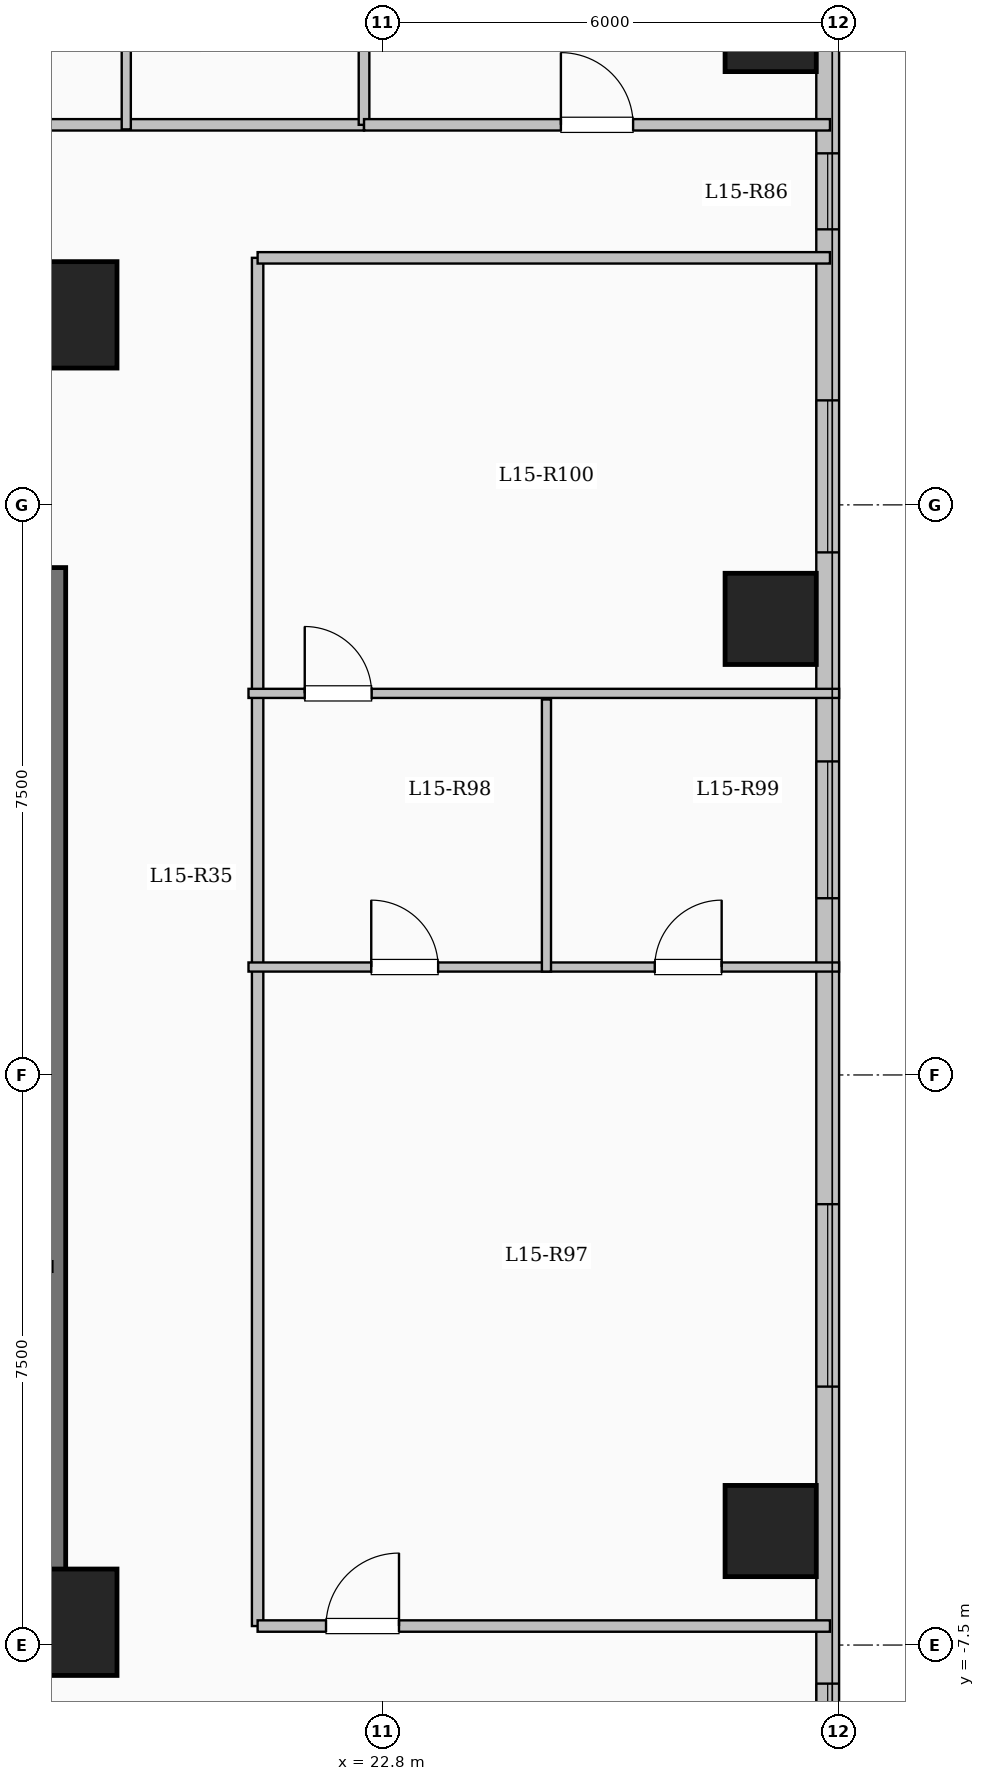
"""IFC4 building model, lengths in metres.
Left out: names, types, materials, properties, quantities, classifications, styles, units other than length and angle.
Written with IfcOpenShell. Run it as: python <this file> out.ifc"""

import sys

from ifc_helpers import new_model, si_unit, direction, frame, frame_2d, origin, origin_2d, place, context, subcontext, project, spatial, rectangle, extrude, element, fill, save


model = new_model("IFC4")
c1 = context("Model", 3, precision=1e-05, world=origin(), true_north=direction((0.0, 1.0)))
c2 = subcontext(c1, "Body", "Model", "MODEL_VIEW")
j1 = project(units=[si_unit("LENGTHUNIT", "METRE"), si_unit("PLANEANGLEUNIT", "RADIAN")], contexts=[c1])
p1 = place(None, origin())
s1 = spatial("IfcSite", under=j1, at=p1, CompositionType="ELEMENT")
p2 = place(p1, origin())
s2 = spatial("IfcBuilding", under=s1, at=p2, CompositionType="ELEMENT")
p3 = place(p2, frame((0.0, 0.0, 57.5)))
s3 = spatial("IfcBuildingStorey", under=s2, at=p3, CompositionType="ELEMENT", Elevation=57.5)
for number, where, z_axis, x_axis in (
    (1, (18.6, -7.2, 0.0), (0.0, 0.0, 1.0), (1.0, 0.0, 0.0)),
    (2, (18.6, 10.0, 0.0), (0.0, 0.0, 1.0), (1.0, 0.0, 0.0)),
):
    element("IfcColumn", number, at=place(p3, frame(where, z_axis=z_axis, x_axis=x_axis)), inside=s3, PredefinedType="COLUMN", context=c2, shape_type="SweptSolid", body=[
        extrude(rectangle(XDim=1.4, YDim=1.4, at=origin_2d()), origin(), (0.0, 0.0, 1.0), 3.35),
    ])
for number, where, z_axis, x_axis in (
    (3, (27.9, -6.0, 0.0), (0.0, 0.0, 1.0), (1.0, 0.0, 0.0)),
    (4, (27.9, 6.0, 0.0), (0.0, 0.0, 1.0), (1.0, 0.0, 0.0)),
    (5, (27.9, 13.8, 0.0), (0.0, 0.0, 1.0), (1.0, 0.0, 0.0)),
):
    element("IfcColumn", number, at=place(p3, frame(where, z_axis=z_axis, x_axis=x_axis)), inside=s3, PredefinedType="COLUMN", context=c2, shape_type="SweptSolid", body=[
        extrude(rectangle(XDim=1.2, YDim=1.2, at=origin_2d()), origin(), (0.0, 0.0, 1.0), 3.35),
    ])
p4 = place(p3, frame((28.65, 19.05, 0.0), z_axis=(0.0, 0.0, 1.0), x_axis=(0.0, -1.0, 0.0)))
e6 = element("IfcWall", 6, at=p4, inside=s3, PredefinedType="SOLIDWALL", context=c2, shape_type="SweptSolid", body=[
    extrude(rectangle(XDim=38.1, YDim=0.3, at=frame_2d((19.05, 0.0))), origin(), (0.0, 0.0, 1.0), 3.1),
])
p5 = place(p4, frame((2.275, 0.0, 0.9)))
e7 = element("IfcOpeningElement", 7, at=p5, cuts=e6, PredefinedType="OPENING", context=c2, shape_type="SweptSolid", body=[
    extrude(rectangle(XDim=2.0, YDim=1.7, at=frame_2d((1.0, 0.85))), frame((0.0, 0.16, 0.0), z_axis=(0.0, -1.0, 0.0), x_axis=(1.0, 0.0, 0.0)), (0.0, 0.0, 1.0), 0.32),
])
p6 = place(p4, frame((6.925, 0.0, 0.95)))
e8 = element("IfcOpeningElement", 8, at=p6, cuts=e6, PredefinedType="OPENING", context=c2, shape_type="SweptSolid", body=[
    extrude(rectangle(XDim=1.0, YDim=1.5, at=frame_2d((0.5, 0.75))), frame((0.0, 0.16, 0.0), z_axis=(0.0, -1.0, 0.0), x_axis=(1.0, 0.0, 0.0)), (0.0, 0.0, 1.0), 0.32),
])
p7 = place(p4, frame((10.175, 0.0, 0.9)))
e9 = element("IfcOpeningElement", 9, at=p7, cuts=e6, PredefinedType="OPENING", context=c2, shape_type="SweptSolid", body=[
    extrude(rectangle(XDim=2.0, YDim=1.7, at=frame_2d((1.0, 0.85))), frame((0.0, 0.16, 0.0), z_axis=(0.0, -1.0, 0.0), x_axis=(1.0, 0.0, 0.0)), (0.0, 0.0, 1.0), 0.32),
])
p8 = place(p4, frame((14.925, 0.0, 0.9)))
e10 = element("IfcOpeningElement", 10, at=p8, cuts=e6, PredefinedType="OPENING", context=c2, shape_type="SweptSolid", body=[
    extrude(rectangle(XDim=1.8, YDim=1.65, at=frame_2d((0.9, 0.825))), frame((0.0, 0.16, 0.0), z_axis=(0.0, -1.0, 0.0), x_axis=(1.0, 0.0, 0.0)), (0.0, 0.0, 1.0), 0.32),
])
p9 = place(p4, frame((20.75, 0.0, 0.9)))
e11 = element("IfcOpeningElement", 11, at=p9, cuts=e6, PredefinedType="OPENING", context=c2, shape_type="SweptSolid", body=[
    extrude(rectangle(XDim=2.4, YDim=1.8, at=frame_2d((1.2, 0.9))), frame((0.0, 0.16, 0.0), z_axis=(0.0, -1.0, 0.0), x_axis=(1.0, 0.0, 0.0)), (0.0, 0.0, 1.0), 0.32),
])
p10 = place(p4, frame((27.058, 0.0, 0.9)))
e12 = element("IfcOpeningElement", 12, at=p10, cuts=e6, PredefinedType="OPENING", context=c2, shape_type="SweptSolid", body=[
    extrude(rectangle(XDim=1.5, YDim=1.65, at=frame_2d((0.75, 0.825))), frame((0.0, 0.16, 0.0), z_axis=(0.0, -1.0, 0.0), x_axis=(1.0, 0.0, 0.0)), (0.0, 0.0, 1.0), 0.32),
])
p11 = place(p4, frame((32.55, 0.0, 0.9)))
e13 = element("IfcOpeningElement", 13, at=p11, cuts=e6, PredefinedType="OPENING", context=c2, shape_type="SweptSolid", body=[
    extrude(rectangle(XDim=2.4, YDim=1.8, at=frame_2d((1.2, 0.9))), frame((0.0, 0.16, 0.0), z_axis=(0.0, -1.0, 0.0), x_axis=(1.0, 0.0, 0.0)), (0.0, 0.0, 1.0), 0.32),
])
p12 = place(p3, frame((18.45, -7.375, 0.0), z_axis=(0.0, 0.0, 1.0), x_axis=(0.0, 1.0, 0.0)))
e14 = element("IfcWall", 14, at=p12, inside=s3, PredefinedType="SHEAR", context=c2, shape_type="SweptSolid", body=[
    extrude(rectangle(XDim=14.05, YDim=0.35, at=frame_2d((7.025, 0.0))), origin(), (0.0, 0.0, 1.0), 3.35),
])
p13 = place(p3, frame((10.075, -7.2, 0.0), z_axis=(0.0, 0.0, 1.0), x_axis=(1.0, 0.0, 0.0)))
e15 = element("IfcWall", 15, at=p13, inside=s3, PredefinedType="SHEAR", context=c2, shape_type="SweptSolid", body=[
    extrude(rectangle(XDim=8.55, YDim=0.35, at=frame_2d((4.275, 0.0))), origin(), (0.0, 0.0, 1.0), 3.35),
])
p14 = place(p3, frame((3.85, 12.5, 0.0), z_axis=(0.0, 0.0, 1.0), x_axis=(1.0, 0.0, 0.0)))
e16 = element("IfcWall", 16, at=p14, inside=s3, PredefinedType="PARTITIONING", context=c2, shape_type="SweptSolid", body=[
    extrude(rectangle(XDim=18.7, YDim=0.15, at=frame_2d((9.35, 0.0))), origin(), (0.0, 0.0, 1.0), 3.1),
])
p15 = place(p14, frame((0.7, 0.0, 0.0)))
e17 = element("IfcOpeningElement", 17, at=p15, cuts=e16, PredefinedType="OPENING", context=c2, shape_type="SweptSolid", body=[
    extrude(rectangle(XDim=0.96, YDim=2.15, at=frame_2d((0.48, 1.075))), frame((0.0, 0.085, 0.0), z_axis=(0.0, -1.0, 0.0), x_axis=(1.0, 0.0, 0.0)), (0.0, 0.0, 1.0), 0.17),
])
p16 = place(p14, frame((8.4, 0.0, 0.0)))
e18 = element("IfcOpeningElement", 18, at=p16, cuts=e16, PredefinedType="OPENING", context=c2, shape_type="SweptSolid", body=[
    extrude(rectangle(XDim=0.96, YDim=2.15, at=frame_2d((0.48, 1.075))), frame((0.0, 0.085, 0.0), z_axis=(0.0, -1.0, 0.0), x_axis=(1.0, 0.0, 0.0)), (0.0, 0.0, 1.0), 0.17),
])
p17 = place(p3, frame((21.15, -7.25, 0.0), z_axis=(0.0, 0.0, 1.0), x_axis=(0.0, 1.0, 0.0)))
e19 = element("IfcWall", 19, at=p17, inside=s3, PredefinedType="PARTITIONING", context=c2, shape_type="SweptSolid", body=[
    extrude(rectangle(XDim=18.0, YDim=0.15, at=frame_2d((9.0, 0.0))), origin(), (0.0, 0.0, 1.0), 2.585),
])
p18 = place(p3, frame((19.422, 12.44, 0.0), z_axis=(0.0, 0.0, 1.0), x_axis=(0.0, 1.0, 0.0)))
e20 = element("IfcWall", 20, at=p18, inside=s3, PredefinedType="PARTITIONING", context=c2, shape_type="SweptSolid", body=[
    extrude(rectangle(XDim=2.45, YDim=0.12, at=frame_2d((1.225, 0.0))), origin(), (0.0, 0.0, 1.0), 3.1),
])
p19 = place(p3, frame((21.15, -7.25, 0.0), z_axis=(0.0, 0.0, 1.0), x_axis=(1.0, 0.0, 0.0)))
e21 = element("IfcWall", 21, at=p19, inside=s3, PredefinedType="PARTITIONING", context=c2, shape_type="SweptSolid", body=[
    extrude(rectangle(XDim=7.53, YDim=0.15, at=frame_2d((3.765, 0.0))), origin(), (0.0, 0.0, 1.0), 3.1),
])
p20 = place(p19, frame((0.9, 0.0, 0.0)))
e22 = element("IfcOpeningElement", 22, at=p20, cuts=e21, PredefinedType="OPENING", context=c2, shape_type="SweptSolid", body=[
    extrude(rectangle(XDim=0.96, YDim=2.15, at=frame_2d((0.48, 1.075))), frame((0.0, 0.085, 0.0), z_axis=(0.0, -1.0, 0.0), x_axis=(1.0, 0.0, 0.0)), (0.0, 0.0, 1.0), 0.17),
])
p21 = place(p3, frame((21.15, 10.75, 0.0), z_axis=(0.0, 0.0, 1.0), x_axis=(1.0, 0.0, 0.0)))
e23 = element("IfcWall", 23, at=p21, inside=s3, PredefinedType="PARTITIONING", context=c2, shape_type="SweptSolid", body=[
    extrude(rectangle(XDim=7.53, YDim=0.15, at=frame_2d((3.765, 0.0))), origin(), (0.0, 0.0, 1.0), 3.1),
])
p22 = place(p3, frame((22.55, 12.5, 0.0), z_axis=(0.0, 0.0, 1.0), x_axis=(0.0, 1.0, 0.0)))
e24 = element("IfcWall", 24, at=p22, inside=s3, PredefinedType="PARTITIONING", context=c2, shape_type="SweptSolid", body=[
    extrude(rectangle(XDim=6.55, YDim=0.14, at=frame_2d((3.275, 0.0))), origin(), (0.0, 0.0, 1.0), 3.1),
])
p23 = place(p3, frame((22.55, 12.5, 0.0), z_axis=(0.0, 0.0, 1.0), x_axis=(1.0, 0.0, 0.0)))
e25 = element("IfcWall", 25, at=p23, inside=s3, PredefinedType="PARTITIONING", context=c2, shape_type="SweptSolid", body=[
    extrude(rectangle(XDim=6.13, YDim=0.15, at=frame_2d((3.065, 0.0))), origin(), (0.0, 0.0, 1.0), 3.1),
])
p24 = place(p23, frame((2.59, 0.0, 0.0)))
e26 = element("IfcOpeningElement", 26, at=p24, cuts=e25, PredefinedType="OPENING", context=c2, shape_type="SweptSolid", body=[
    extrude(rectangle(XDim=0.95, YDim=2.15, at=frame_2d((0.475, 1.075))), frame((0.0, 0.085, 0.0), z_axis=(0.0, -1.0, 0.0), x_axis=(1.0, 0.0, 0.0)), (0.0, 0.0, 1.0), 0.17),
])
p25 = place(p3, frame((21.03, 1.42, 0.0), z_axis=(0.0, 0.0, 1.0), x_axis=(1.0, 0.0, 0.0)))
e27 = element("IfcWall", 27, at=p25, inside=s3, PredefinedType="PARTITIONING", context=c2, shape_type="SweptSolid", body=[
    extrude(rectangle(XDim=7.77, YDim=0.12, at=frame_2d((3.885, 0.0))), origin(), (0.0, 0.0, 1.0), 3.1),
])
p26 = place(p25, frame((1.615, 0.0, 0.0)))
e28 = element("IfcOpeningElement", 28, at=p26, cuts=e27, PredefinedType="OPENING", context=c2, shape_type="SweptSolid", body=[
    extrude(rectangle(XDim=0.88, YDim=2.1, at=frame_2d((0.44, 1.05))), frame((0.0, 0.07, 0.0), z_axis=(0.0, -1.0, 0.0), x_axis=(1.0, 0.0, 0.0)), (0.0, 0.0, 1.0), 0.14),
])
p27 = place(p25, frame((5.345, 0.0, 0.0)))
e29 = element("IfcOpeningElement", 29, at=p27, cuts=e27, PredefinedType="OPENING", context=c2, shape_type="SweptSolid", body=[
    extrude(rectangle(XDim=0.88, YDim=2.1, at=frame_2d((0.44, 1.05))), frame((0.0, 0.07, 0.0), z_axis=(0.0, -1.0, 0.0), x_axis=(1.0, 0.0, 0.0)), (0.0, 0.0, 1.0), 0.14),
])
p28 = place(p3, frame((21.03, 5.02, 0.0), z_axis=(0.0, 0.0, 1.0), x_axis=(1.0, 0.0, 0.0)))
e30 = element("IfcWall", 30, at=p28, inside=s3, PredefinedType="PARTITIONING", context=c2, shape_type="SweptSolid", body=[
    extrude(rectangle(XDim=7.77, YDim=0.12, at=frame_2d((3.885, 0.0))), origin(), (0.0, 0.0, 1.0), 3.1),
])
p29 = place(p28, frame((0.74, 0.0, 0.0)))
e31 = element("IfcOpeningElement", 31, at=p29, cuts=e30, PredefinedType="OPENING", context=c2, shape_type="SweptSolid", body=[
    extrude(rectangle(XDim=0.88, YDim=2.1, at=frame_2d((0.44, 1.05))), frame((0.0, 0.07, 0.0), z_axis=(0.0, -1.0, 0.0), x_axis=(1.0, 0.0, 0.0)), (0.0, 0.0, 1.0), 0.14),
])
p30 = place(p3, frame((24.95, 1.36, 0.0), z_axis=(0.0, 0.0, 1.0), x_axis=(0.0, 1.0, 0.0)))
e32 = element("IfcWall", 32, at=p30, inside=s3, PredefinedType="PARTITIONING", context=c2, shape_type="SweptSolid", body=[
    extrude(rectangle(XDim=3.58, YDim=0.12, at=frame_2d((1.79, 0.0))), origin(), (0.0, 0.0, 1.0), 3.1),
])
p31 = place(p6, origin())
e33 = element("IfcWindow", 33, at=p31, inside=s3, PartitioningType="SINGLE_PANEL", PredefinedType="WINDOW", context=c2, shape_type="SweptSolid", body=[
    extrude(rectangle(XDim=1.0, YDim=1.5, at=frame_2d((0.5, 0.75))), frame((0.0, 0.03, 0.0), z_axis=(0.0, -1.0, 0.0), x_axis=(1.0, 0.0, 0.0)), (0.0, 0.0, 1.0), 0.06),
])
fill(e8, e33)
p32 = place(p7, origin())
e34 = element("IfcWindow", 34, at=p32, inside=s3, PartitioningType="SINGLE_PANEL", PredefinedType="WINDOW", context=c2, shape_type="SweptSolid", body=[
    extrude(rectangle(XDim=2.0, YDim=1.7, at=frame_2d((1.0, 0.85))), frame((0.0, 0.03, 0.0), z_axis=(0.0, -1.0, 0.0), x_axis=(1.0, 0.0, 0.0)), (0.0, 0.0, 1.0), 0.06),
])
fill(e9, e34)
p33 = place(p8, origin())
e35 = element("IfcWindow", 35, at=p33, inside=s3, PartitioningType="SINGLE_PANEL", PredefinedType="WINDOW", context=c2, shape_type="SweptSolid", body=[
    extrude(rectangle(XDim=1.8, YDim=1.65, at=frame_2d((0.9, 0.825))), frame((0.0, 0.03, 0.0), z_axis=(0.0, -1.0, 0.0), x_axis=(1.0, 0.0, 0.0)), (0.0, 0.0, 1.0), 0.06),
])
fill(e10, e35)
p34 = place(p9, origin())
e36 = element("IfcWindow", 36, at=p34, inside=s3, PartitioningType="SINGLE_PANEL", PredefinedType="WINDOW", context=c2, shape_type="SweptSolid", body=[
    extrude(rectangle(XDim=2.4, YDim=1.8, at=frame_2d((1.2, 0.9))), frame((0.0, 0.03, 0.0), z_axis=(0.0, -1.0, 0.0), x_axis=(1.0, 0.0, 0.0)), (0.0, 0.0, 1.0), 0.06),
])
fill(e11, e36)
p35 = place(p10, origin())
e37 = element("IfcWindow", 37, at=p35, inside=s3, PartitioningType="SINGLE_PANEL", PredefinedType="WINDOW", context=c2, shape_type="SweptSolid", body=[
    extrude(rectangle(XDim=1.5, YDim=1.65, at=frame_2d((0.75, 0.825))), frame((0.0, 0.03, 0.0), z_axis=(0.0, -1.0, 0.0), x_axis=(1.0, 0.0, 0.0)), (0.0, 0.0, 1.0), 0.06),
])
fill(e12, e37)
p36 = place(p24, origin())
e38 = element("IfcDoor", 38, at=p36, inside=s3, OperationType="SINGLE_SWING_LEFT", PredefinedType="DOOR", context=c2, shape_type="SweptSolid", body=[
    extrude(rectangle(XDim=0.95, YDim=2.15, at=frame_2d((0.475, 1.075))), frame((0.0, 0.025, 0.0), z_axis=(0.0, -1.0, 0.0), x_axis=(1.0, 0.0, 0.0)), (0.0, 0.0, 1.0), 0.05),
])
fill(e26, e38)
p37 = place(p20, origin())
e39 = element("IfcDoor", 39, at=p37, inside=s3, OperationType="SINGLE_SWING_RIGHT", PredefinedType="DOOR", context=c2, shape_type="SweptSolid", body=[
    extrude(rectangle(XDim=0.96, YDim=2.15, at=frame_2d((0.48, 1.075))), frame((0.0, 0.025, 0.0), z_axis=(0.0, -1.0, 0.0), x_axis=(1.0, 0.0, 0.0)), (0.0, 0.0, 1.0), 0.05),
])
fill(e22, e39)
p38 = place(p26, origin())
e40 = element("IfcDoor", 40, at=p38, inside=s3, OperationType="SINGLE_SWING_LEFT", PredefinedType="DOOR", context=c2, shape_type="SweptSolid", body=[
    extrude(rectangle(XDim=0.88, YDim=2.1, at=frame_2d((0.44, 1.05))), frame((0.0, 0.025, 0.0), z_axis=(0.0, -1.0, 0.0), x_axis=(1.0, 0.0, 0.0)), (0.0, 0.0, 1.0), 0.05),
])
fill(e28, e40)
p39 = place(p27, origin())
e41 = element("IfcDoor", 41, at=p39, inside=s3, OperationType="SINGLE_SWING_RIGHT", PredefinedType="DOOR", context=c2, shape_type="SweptSolid", body=[
    extrude(rectangle(XDim=0.88, YDim=2.1, at=frame_2d((0.44, 1.05))), frame((0.0, 0.025, 0.0), z_axis=(0.0, -1.0, 0.0), x_axis=(1.0, 0.0, 0.0)), (0.0, 0.0, 1.0), 0.05),
])
fill(e29, e41)
p40 = place(p29, origin())
e42 = element("IfcDoor", 42, at=p40, inside=s3, OperationType="SINGLE_SWING_LEFT", PredefinedType="DOOR", context=c2, shape_type="SweptSolid", body=[
    extrude(rectangle(XDim=0.88, YDim=2.1, at=frame_2d((0.44, 1.05))), frame((0.0, 0.025, 0.0), z_axis=(0.0, -1.0, 0.0), x_axis=(1.0, 0.0, 0.0)), (0.0, 0.0, 1.0), 0.05),
])
fill(e31, e42)
save(model, sys.argv[1])
